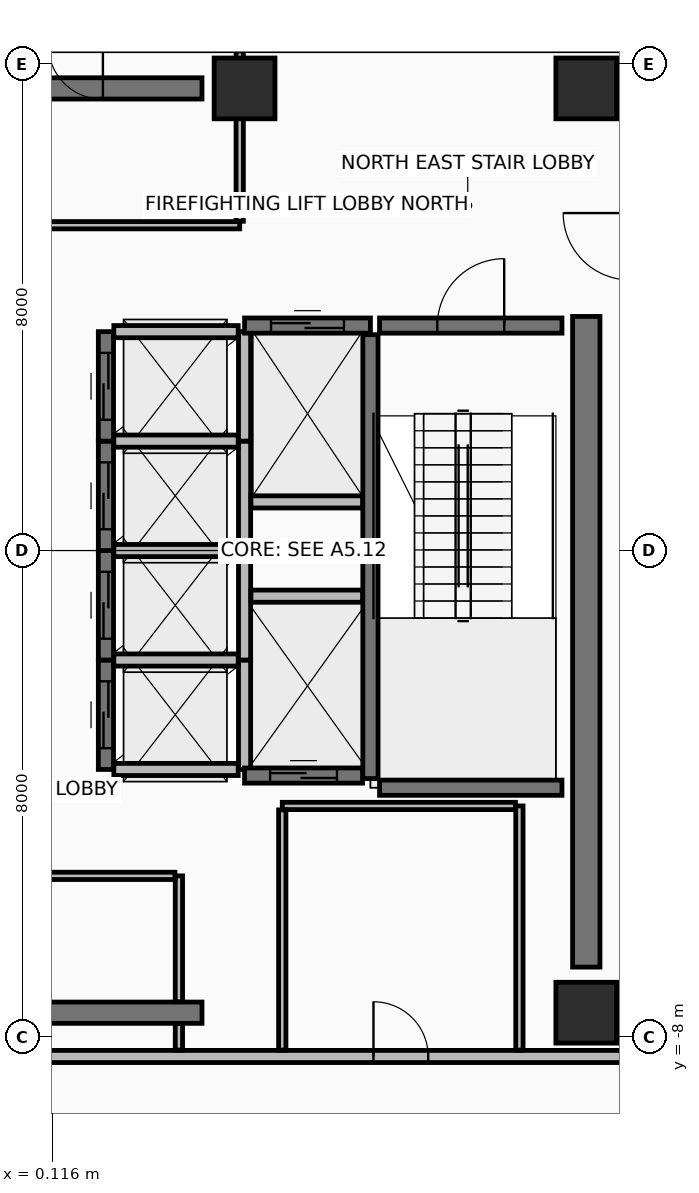
"""IFC4 building model, lengths in metres.
Left out: names, types, materials, properties, quantities, classifications, styles, units other than length and angle.
Written with IfcOpenShell. Run it as: python <this file> out.ifc"""

import sys

from ifc_helpers import new_model, si_unit, direction, frame, frame_2d, origin, origin_2d, place, context, subcontext, project, spatial, rectangle, extrude, element, fill, save


model = new_model("IFC4")
c1 = context("Model", 3, precision=1e-05, world=origin(), true_north=direction((0.0, 1.0)))
c2 = subcontext(c1, "Body", "Model", "MODEL_VIEW")
j1 = project(units=[si_unit("LENGTHUNIT", "METRE"), si_unit("PLANEANGLEUNIT", "RADIAN")], contexts=[c1])
p1 = place(None, origin())
s1 = spatial("IfcSite", under=j1, at=p1, CompositionType="ELEMENT")
p2 = place(p1, origin())
s2 = spatial("IfcBuilding", under=s1, at=p2, CompositionType="ELEMENT")
p3 = place(p2, frame((0.0, 0.0, 275.0)))
s3 = spatial("IfcBuildingStorey", under=s2, at=p3, CompositionType="ELEMENT", Elevation=275.0)
for number, where, z_axis, x_axis in (
    (1, (8.9, -7.6, 0.0), (0.0, 0.0, 1.0), (1.0, 0.0, 0.0)),
    (2, (8.9, 7.6, 0.0), (0.0, 0.0, 1.0), (1.0, 0.0, 0.0)),
    (3, (3.28, 7.6, 0.0), (0.0, 0.0, 1.0), (1.0, 0.0, 0.0)),
):
    element("IfcColumn", number, at=place(p3, frame(where, z_axis=z_axis, x_axis=x_axis)), inside=s3, PredefinedType="COLUMN", context=c2, shape_type="SweptSolid", body=[
        extrude(rectangle(XDim=1.0, YDim=1.0, at=origin_2d()), origin(), (0.0, 0.0, 1.0), 4.75),
    ])
for number, where, z_axis, x_axis in (
    (4, (-2.8, -7.6, 0.0), (0.0, 0.0, 1.0), (1.0, 0.0, 0.0)),
    (5, (-2.8, 7.6, 0.0), (0.0, 0.0, 1.0), (1.0, 0.0, 0.0)),
):
    element("IfcWall", number, at=place(p3, frame(where, z_axis=z_axis, x_axis=x_axis)), inside=s3, PredefinedType="SHEAR", context=c2, shape_type="SweptSolid", body=[
        extrude(rectangle(XDim=5.38, YDim=0.35, at=frame_2d((2.69, 0.0))), origin(), (0.0, 0.0, 1.0), 4.56),
    ])
p4 = place(p3, frame((8.9, -6.85, 0.0), z_axis=(0.0, 0.0, 1.0), x_axis=(0.0, 1.0, 0.0)))
e6 = element("IfcWall", 6, at=p4, inside=s3, PredefinedType="SHEAR", context=c2, shape_type="SweptSolid", body=[
    extrude(rectangle(XDim=10.7, YDim=0.45, at=frame_2d((5.35, 0.0))), origin(), (0.0, 0.0, 1.0), 4.56),
])
p5 = place(p3, frame((-9.62, -8.32, 0.0), z_axis=(0.0, 0.0, 1.0), x_axis=(1.0, 0.0, 0.0)))
e7 = element("IfcWall", 7, at=p5, inside=s3, PredefinedType="PARTITIONING", context=c2, shape_type="SweptSolid", body=[
    extrude(rectangle(XDim=19.24, YDim=0.2, at=frame_2d((9.62, 0.0))), origin(), (0.0, 0.0, 1.0), 2.355),
])
p6 = place(p5, frame((8.57, 0.0, 0.0)))
e8 = element("IfcOpeningElement", 8, at=p6, cuts=e7, PredefinedType="OPENING", context=c2, shape_type="SweptSolid", body=[
    extrude(rectangle(XDim=0.9, YDim=2.1, at=frame_2d((0.45, 1.05))), frame((0.0, 0.11, 0.0), z_axis=(0.0, -1.0, 0.0), x_axis=(1.0, 0.0, 0.0)), (0.0, 0.0, 1.0), 0.22),
])
p7 = place(p5, frame((15.02, 0.0, 0.0)))
e9 = element("IfcOpeningElement", 9, at=p7, cuts=e7, PredefinedType="OPENING", context=c2, shape_type="SweptSolid", body=[
    extrude(rectangle(XDim=0.9, YDim=2.1, at=frame_2d((0.45, 1.05))), frame((0.0, 0.11, 0.0), z_axis=(0.0, -1.0, 0.0), x_axis=(1.0, 0.0, 0.0)), (0.0, 0.0, 1.0), 0.22),
])
p8 = place(p3, frame((5.35, -3.75, 0.0), z_axis=(0.0, 0.0, 1.0), x_axis=(0.0, 1.0, 0.0)))
e10 = element("IfcWall", 10, at=p8, inside=s3, PredefinedType="SHEAR", context=c2, shape_type="SweptSolid", body=[
    extrude(rectangle(XDim=7.3, YDim=0.25, at=frame_2d((3.65, 0.0))), origin(), (0.0, 0.0, 1.0), 4.56),
])
p9 = place(p3, frame((5.5, 3.7, 0.0), z_axis=(0.0, 0.0, 1.0), x_axis=(1.0, 0.0, 0.0)))
e11 = element("IfcWall", 11, at=p9, inside=s3, PredefinedType="SHEAR", context=c2, shape_type="SweptSolid", body=[
    extrude(rectangle(XDim=3.0, YDim=0.25, at=frame_2d((1.5, 0.0))), origin(), (0.0, 0.0, 1.0), 4.56),
])
p10 = place(p9, frame((0.95, 0.0, 0.0)))
e12 = element("IfcOpeningElement", 12, at=p10, cuts=e11, PredefinedType="OPENING", context=c2, shape_type="SweptSolid", body=[
    extrude(rectangle(XDim=1.1, YDim=2.15, at=frame_2d((0.55, 1.075))), frame((0.0, 0.135, 0.0), z_axis=(0.0, -1.0, 0.0), x_axis=(1.0, 0.0, 0.0)), (0.0, 0.0, 1.0), 0.27),
])
p11 = place(p3, frame((5.5, -3.9, 0.0), z_axis=(0.0, 0.0, 1.0), x_axis=(1.0, 0.0, 0.0)))
e13 = element("IfcWall", 13, at=p11, inside=s3, PredefinedType="SHEAR", context=c2, shape_type="SweptSolid", body=[
    extrude(rectangle(XDim=3.0, YDim=0.25, at=frame_2d((1.5, 0.0))), origin(), (0.0, 0.0, 1.0), 4.56),
])
p12 = place(p3, frame((1.0, -3.6, 0.0), z_axis=(0.0, 0.0, 1.0), x_axis=(0.0, 1.0, 0.0)))
e14 = element("IfcWall", 14, at=p12, inside=s3, PredefinedType="SHEAR", context=c2, shape_type="SweptSolid", body=[
    extrude(rectangle(XDim=1.8, YDim=0.25, at=frame_2d((0.9, 0.0))), origin(), (0.0, 0.0, 1.0), 4.56),
])
p13 = place(p12, frame((0.35, 0.0, 0.0)))
e15 = element("IfcOpeningElement", 15, at=p13, cuts=e14, PredefinedType="OPENING", context=c2, shape_type="SweptSolid", body=[
    extrude(rectangle(XDim=1.1, YDim=2.2, at=frame_2d((0.55, 1.1))), frame((0.0, 0.135, 0.0), z_axis=(0.0, -1.0, 0.0), x_axis=(1.0, 0.0, 0.0)), (0.0, 0.0, 1.0), 0.27),
])
p14 = place(p3, frame((3.28, -3.6, 0.0), z_axis=(0.0, 0.0, 1.0), x_axis=(0.0, 1.0, 0.0)))
e16 = element("IfcWall", 16, at=p14, inside=s3, PredefinedType="PARTITIONING", context=c2, shape_type="SweptSolid", body=[
    extrude(rectangle(XDim=1.8, YDim=0.2, at=frame_2d((0.9, 0.0))), origin(), (0.0, 0.0, 1.0), 4.56),
])
for number, where, z_axis, x_axis in (
    (17, (1.13, -3.6, 0.0), (0.0, 0.0, 1.0), (1.0, 0.0, 0.0)),
    (18, (1.13, -1.8, 0.0), (0.0, 0.0, 1.0), (1.0, 0.0, 0.0)),
):
    element("IfcWall", number, at=place(p3, frame(where, z_axis=z_axis, x_axis=x_axis)), inside=s3, PredefinedType="PARTITIONING", context=c2, shape_type="SweptSolid", body=[
        extrude(rectangle(XDim=2.045, YDim=0.2, at=frame_2d((1.022, 0.0))), origin(), (0.0, 0.0, 1.0), 4.56),
    ])
p15 = place(p3, frame((1.0, -1.8, 0.0), z_axis=(0.0, 0.0, 1.0), x_axis=(0.0, 1.0, 0.0)))
e19 = element("IfcWall", 19, at=p15, inside=s3, PredefinedType="SHEAR", context=c2, shape_type="SweptSolid", body=[
    extrude(rectangle(XDim=1.8, YDim=0.25, at=frame_2d((0.9, 0.0))), origin(), (0.0, 0.0, 1.0), 4.56),
])
p16 = place(p15, frame((0.35, 0.0, 0.0)))
e20 = element("IfcOpeningElement", 20, at=p16, cuts=e19, PredefinedType="OPENING", context=c2, shape_type="SweptSolid", body=[
    extrude(rectangle(XDim=1.1, YDim=2.2, at=frame_2d((0.55, 1.1))), frame((0.0, 0.135, 0.0), z_axis=(0.0, -1.0, 0.0), x_axis=(1.0, 0.0, 0.0)), (0.0, 0.0, 1.0), 0.27),
])
p17 = place(p3, frame((3.28, -1.8, 0.0), z_axis=(0.0, 0.0, 1.0), x_axis=(0.0, 1.0, 0.0)))
e21 = element("IfcWall", 21, at=p17, inside=s3, PredefinedType="PARTITIONING", context=c2, shape_type="SweptSolid", body=[
    extrude(rectangle(XDim=1.8, YDim=0.2, at=frame_2d((0.9, 0.0))), origin(), (0.0, 0.0, 1.0), 4.56),
])
p18 = place(p3, frame((1.13, 0.0, 0.0), z_axis=(0.0, 0.0, 1.0), x_axis=(1.0, 0.0, 0.0)))
e22 = element("IfcWall", 22, at=p18, inside=s3, PredefinedType="PARTITIONING", context=c2, shape_type="SweptSolid", body=[
    extrude(rectangle(XDim=2.045, YDim=0.2, at=frame_2d((1.022, 0.0))), origin(), (0.0, 0.0, 1.0), 4.56),
])
p19 = place(p3, frame((1.0, 0.0, 0.0), z_axis=(0.0, 0.0, 1.0), x_axis=(0.0, 1.0, 0.0)))
e23 = element("IfcWall", 23, at=p19, inside=s3, PredefinedType="SHEAR", context=c2, shape_type="SweptSolid", body=[
    extrude(rectangle(XDim=1.8, YDim=0.25, at=frame_2d((0.9, 0.0))), origin(), (0.0, 0.0, 1.0), 4.56),
])
p20 = place(p19, frame((0.35, 0.0, 0.0)))
e24 = element("IfcOpeningElement", 24, at=p20, cuts=e23, PredefinedType="OPENING", context=c2, shape_type="SweptSolid", body=[
    extrude(rectangle(XDim=1.1, YDim=2.2, at=frame_2d((0.55, 1.1))), frame((0.0, 0.135, 0.0), z_axis=(0.0, -1.0, 0.0), x_axis=(1.0, 0.0, 0.0)), (0.0, 0.0, 1.0), 0.27),
])
p21 = place(p3, frame((3.28, 0.0, 0.0), z_axis=(0.0, 0.0, 1.0), x_axis=(0.0, 1.0, 0.0)))
e25 = element("IfcWall", 25, at=p21, inside=s3, PredefinedType="PARTITIONING", context=c2, shape_type="SweptSolid", body=[
    extrude(rectangle(XDim=1.8, YDim=0.2, at=frame_2d((0.9, 0.0))), origin(), (0.0, 0.0, 1.0), 4.56),
])
p22 = place(p3, frame((1.13, 1.8, 0.0), z_axis=(0.0, 0.0, 1.0), x_axis=(1.0, 0.0, 0.0)))
e26 = element("IfcWall", 26, at=p22, inside=s3, PredefinedType="PARTITIONING", context=c2, shape_type="SweptSolid", body=[
    extrude(rectangle(XDim=2.045, YDim=0.2, at=frame_2d((1.022, 0.0))), origin(), (0.0, 0.0, 1.0), 4.56),
])
p23 = place(p3, frame((1.0, 1.8, 0.0), z_axis=(0.0, 0.0, 1.0), x_axis=(0.0, 1.0, 0.0)))
e27 = element("IfcWall", 27, at=p23, inside=s3, PredefinedType="SHEAR", context=c2, shape_type="SweptSolid", body=[
    extrude(rectangle(XDim=1.8, YDim=0.25, at=frame_2d((0.9, 0.0))), origin(), (0.0, 0.0, 1.0), 4.56),
])
p24 = place(p23, frame((0.35, 0.0, 0.0)))
e28 = element("IfcOpeningElement", 28, at=p24, cuts=e27, PredefinedType="OPENING", context=c2, shape_type="SweptSolid", body=[
    extrude(rectangle(XDim=1.1, YDim=2.2, at=frame_2d((0.55, 1.1))), frame((0.0, 0.135, 0.0), z_axis=(0.0, -1.0, 0.0), x_axis=(1.0, 0.0, 0.0)), (0.0, 0.0, 1.0), 0.27),
])
p25 = place(p3, frame((3.28, 1.8, 0.0), z_axis=(0.0, 0.0, 1.0), x_axis=(0.0, 1.0, 0.0)))
e29 = element("IfcWall", 29, at=p25, inside=s3, PredefinedType="PARTITIONING", context=c2, shape_type="SweptSolid", body=[
    extrude(rectangle(XDim=1.8, YDim=0.2, at=frame_2d((0.9, 0.0))), origin(), (0.0, 0.0, 1.0), 4.56),
])
p26 = place(p3, frame((1.13, 3.6, 0.0), z_axis=(0.0, 0.0, 1.0), x_axis=(1.0, 0.0, 0.0)))
e30 = element("IfcWall", 30, at=p26, inside=s3, PredefinedType="PARTITIONING", context=c2, shape_type="SweptSolid", body=[
    extrude(rectangle(XDim=2.045, YDim=0.2, at=frame_2d((1.022, 0.0))), origin(), (0.0, 0.0, 1.0), 3.855),
])
p27 = place(p3, frame((3.28, 3.7, 0.0), z_axis=(0.0, 0.0, 1.0), x_axis=(1.0, 0.0, 0.0)))
e31 = element("IfcWall", 31, at=p27, inside=s3, PredefinedType="SHEAR", context=c2, shape_type="SweptSolid", body=[
    extrude(rectangle(XDim=2.07, YDim=0.25, at=frame_2d((1.035, 0.0))), origin(), (0.0, 0.0, 1.0), 4.56),
])
p28 = place(p27, frame((0.435, 0.0, 0.0)))
e32 = element("IfcOpeningElement", 32, at=p28, cuts=e31, PredefinedType="OPENING", context=c2, shape_type="SweptSolid", body=[
    extrude(rectangle(XDim=1.2, YDim=2.2, at=frame_2d((0.6, 1.1))), frame((0.0, 0.135, 0.0), z_axis=(0.0, -1.0, 0.0), x_axis=(1.0, 0.0, 0.0)), (0.0, 0.0, 1.0), 0.27),
])
p29 = place(p3, frame((3.385, 0.8, 0.0), z_axis=(0.0, 0.0, 1.0), x_axis=(1.0, 0.0, 0.0)))
e33 = element("IfcWall", 33, at=p29, inside=s3, PredefinedType="PARTITIONING", context=c2, shape_type="SweptSolid", body=[
    extrude(rectangle(XDim=1.835, YDim=0.2, at=frame_2d((0.917, 0.0))), origin(), (0.0, 0.0, 1.0), 4.56),
])
p30 = place(p3, frame((3.28, -3.7, 0.0), z_axis=(0.0, 0.0, 1.0), x_axis=(1.0, 0.0, 0.0)))
e34 = element("IfcWall", 34, at=p30, inside=s3, PredefinedType="SHEAR", context=c2, shape_type="SweptSolid", body=[
    extrude(rectangle(XDim=1.94, YDim=0.25, at=frame_2d((0.97, 0.0))), origin(), (0.0, 0.0, 1.0), 4.56),
])
p31 = place(p30, frame((0.42, 0.0, 0.0)))
e35 = element("IfcOpeningElement", 35, at=p31, cuts=e34, PredefinedType="OPENING", context=c2, shape_type="SweptSolid", body=[
    extrude(rectangle(XDim=1.1, YDim=2.2, at=frame_2d((0.55, 1.1))), frame((0.0, 0.135, 0.0), z_axis=(0.0, -1.0, 0.0), x_axis=(1.0, 0.0, 0.0)), (0.0, 0.0, 1.0), 0.27),
])
p32 = place(p3, frame((3.385, -0.75, 0.0), z_axis=(0.0, 0.0, 1.0), x_axis=(1.0, 0.0, 0.0)))
e36 = element("IfcWall", 36, at=p32, inside=s3, PredefinedType="PARTITIONING", context=c2, shape_type="SweptSolid", body=[
    extrude(rectangle(XDim=1.835, YDim=0.2, at=frame_2d((0.917, 0.0))), origin(), (0.0, 0.0, 1.0), 4.56),
])
p33 = place(p3, frame((2.2, -8.215, 0.0), z_axis=(0.0, 0.0, 1.0), x_axis=(0.0, 1.0, 0.0)))
e37 = element("IfcWall", 37, at=p33, inside=s3, PredefinedType="PARTITIONING", context=c2, shape_type="SweptSolid", body=[
    extrude(rectangle(XDim=0.435, YDim=0.12, at=frame_2d((0.218, 0.0))), origin(), (0.0, 0.0, 1.0), 3.855),
])
p34 = place(p3, frame((2.2, -7.42, 0.0), z_axis=(0.0, 0.0, 1.0), x_axis=(0.0, 1.0, 0.0)))
e38 = element("IfcWall", 38, at=p34, inside=s3, PredefinedType="PARTITIONING", context=c2, shape_type="SweptSolid", body=[
    extrude(rectangle(XDim=2.07, YDim=0.12, at=frame_2d((1.035, 0.0))), origin(), (0.0, 0.0, 1.0), 3.855),
])
p35 = place(p3, frame((2.135, -5.35, 0.0), z_axis=(0.0, 0.0, 1.0), x_axis=(-1.0, 0.0, 0.0)))
e39 = element("IfcWall", 39, at=p35, inside=s3, PredefinedType="PARTITIONING", context=c2, shape_type="SweptSolid", body=[
    extrude(rectangle(XDim=5.535, YDim=0.12, at=frame_2d((2.768, 0.0))), origin(), (0.0, 0.0, 1.0), 3.855),
])
p36 = place(p3, frame((-2.2, 5.35, 0.0), z_axis=(0.0, 0.0, 1.0), x_axis=(1.0, 0.0, 0.0)))
e40 = element("IfcWall", 40, at=p36, inside=s3, PredefinedType="PARTITIONING", context=c2, shape_type="SweptSolid", body=[
    extrude(rectangle(XDim=5.4, YDim=0.12, at=frame_2d((2.7, 0.0))), origin(), (0.0, 0.0, 1.0), 3.855),
])
p37 = place(p3, frame((3.2, 5.415, 0.0), z_axis=(0.0, 0.0, 1.0), x_axis=(0.0, 1.0, 0.0)))
e41 = element("IfcWall", 41, at=p37, inside=s3, PredefinedType="PARTITIONING", context=c2, shape_type="SweptSolid", body=[
    extrude(rectangle(XDim=2.8, YDim=0.12, at=frame_2d((1.4, 0.0))), origin(), (0.0, 0.0, 1.0), 2.355),
])
p38 = place(p3, frame((7.8, -8.215, 0.0), z_axis=(0.0, 0.0, 1.0), x_axis=(0.0, 1.0, 0.0)))
e42 = element("IfcWall", 42, at=p38, inside=s3, PredefinedType="PARTITIONING", context=c2, shape_type="SweptSolid", body=[
    extrude(rectangle(XDim=4.015, YDim=0.12, at=frame_2d((2.008, 0.0))), origin(), (0.0, 0.0, 1.0), 3.855),
])
p39 = place(p3, frame((7.735, -4.2, 0.0), z_axis=(0.0, 0.0, 1.0), x_axis=(-1.0, 0.0, 0.0)))
e43 = element("IfcWall", 43, at=p39, inside=s3, PredefinedType="PARTITIONING", context=c2, shape_type="SweptSolid", body=[
    extrude(rectangle(XDim=3.835, YDim=0.12, at=frame_2d((1.917, 0.0))), origin(), (0.0, 0.0, 1.0), 4.56),
])
p40 = place(p3, frame((3.9, -4.265, 0.0), z_axis=(0.0, 0.0, 1.0), x_axis=(0.0, -1.0, 0.0)))
e44 = element("IfcWall", 44, at=p40, inside=s3, PredefinedType="PARTITIONING", context=c2, shape_type="SweptSolid", body=[
    extrude(rectangle(XDim=3.95, YDim=0.12, at=frame_2d((1.975, 0.0))), origin(), (0.0, 0.0, 1.0), 3.855),
])
p41 = place(p10, frame((1.1, 0.0, 0.0), z_axis=(0.0, 0.0, 1.0), x_axis=(-1.0, 0.0, 0.0)))
e45 = element("IfcDoor", 45, at=p41, inside=s3, OperationType="SINGLE_SWING_LEFT", PredefinedType="DOOR", context=c2, shape_type="SweptSolid", body=[
    extrude(rectangle(XDim=1.1, YDim=2.15, at=frame_2d((0.55, 1.075))), frame((0.0, 0.025, 0.0), z_axis=(0.0, -1.0, 0.0), x_axis=(1.0, 0.0, 0.0)), (0.0, 0.0, 1.0), 0.05),
])
fill(e12, e45)
p42 = place(p13, origin())
e46 = element("IfcDoor", 46, at=p42, inside=s3, OperationType="SLIDING_TO_LEFT", PredefinedType="DOOR", context=c2, shape_type="SweptSolid", body=[
    extrude(rectangle(XDim=1.1, YDim=2.2, at=frame_2d((0.55, 1.1))), frame((0.0, 0.025, 0.0), z_axis=(0.0, -1.0, 0.0), x_axis=(1.0, 0.0, 0.0)), (0.0, 0.0, 1.0), 0.05),
])
fill(e15, e46)
p43 = place(p16, origin())
e47 = element("IfcDoor", 47, at=p43, inside=s3, OperationType="SLIDING_TO_LEFT", PredefinedType="DOOR", context=c2, shape_type="SweptSolid", body=[
    extrude(rectangle(XDim=1.1, YDim=2.2, at=frame_2d((0.55, 1.1))), frame((0.0, 0.025, 0.0), z_axis=(0.0, -1.0, 0.0), x_axis=(1.0, 0.0, 0.0)), (0.0, 0.0, 1.0), 0.05),
])
fill(e20, e47)
p44 = place(p20, origin())
e48 = element("IfcDoor", 48, at=p44, inside=s3, OperationType="SLIDING_TO_LEFT", PredefinedType="DOOR", context=c2, shape_type="SweptSolid", body=[
    extrude(rectangle(XDim=1.1, YDim=2.2, at=frame_2d((0.55, 1.1))), frame((0.0, 0.025, 0.0), z_axis=(0.0, -1.0, 0.0), x_axis=(1.0, 0.0, 0.0)), (0.0, 0.0, 1.0), 0.05),
])
fill(e24, e48)
p45 = place(p24, origin())
e49 = element("IfcDoor", 49, at=p45, inside=s3, OperationType="SLIDING_TO_LEFT", PredefinedType="DOOR", context=c2, shape_type="SweptSolid", body=[
    extrude(rectangle(XDim=1.1, YDim=2.2, at=frame_2d((0.55, 1.1))), frame((0.0, 0.025, 0.0), z_axis=(0.0, -1.0, 0.0), x_axis=(1.0, 0.0, 0.0)), (0.0, 0.0, 1.0), 0.05),
])
fill(e28, e49)
p46 = place(p28, origin())
e50 = element("IfcDoor", 50, at=p46, inside=s3, OperationType="SLIDING_TO_RIGHT", PredefinedType="DOOR", context=c2, shape_type="SweptSolid", body=[
    extrude(rectangle(XDim=1.2, YDim=2.2, at=frame_2d((0.6, 1.1))), frame((0.0, 0.025, 0.0), z_axis=(0.0, -1.0, 0.0), x_axis=(1.0, 0.0, 0.0)), (0.0, 0.0, 1.0), 0.05),
])
fill(e32, e50)
p47 = place(p31, origin())
e51 = element("IfcDoor", 51, at=p47, inside=s3, OperationType="SLIDING_TO_LEFT", PredefinedType="DOOR", context=c2, shape_type="SweptSolid", body=[
    extrude(rectangle(XDim=1.1, YDim=2.2, at=frame_2d((0.55, 1.1))), frame((0.0, 0.025, 0.0), z_axis=(0.0, -1.0, 0.0), x_axis=(1.0, 0.0, 0.0)), (0.0, 0.0, 1.0), 0.05),
])
fill(e35, e51)
p48 = place(p7, origin())
e52 = element("IfcDoor", 52, at=p48, inside=s3, OperationType="SINGLE_SWING_LEFT", PredefinedType="DOOR", context=c2, shape_type="SweptSolid", body=[
    extrude(rectangle(XDim=0.9, YDim=2.1, at=frame_2d((0.45, 1.05))), frame((0.0, 0.025, 0.0), z_axis=(0.0, -1.0, 0.0), x_axis=(1.0, 0.0, 0.0)), (0.0, 0.0, 1.0), 0.05),
])
fill(e9, e52)
save(model, sys.argv[1])
